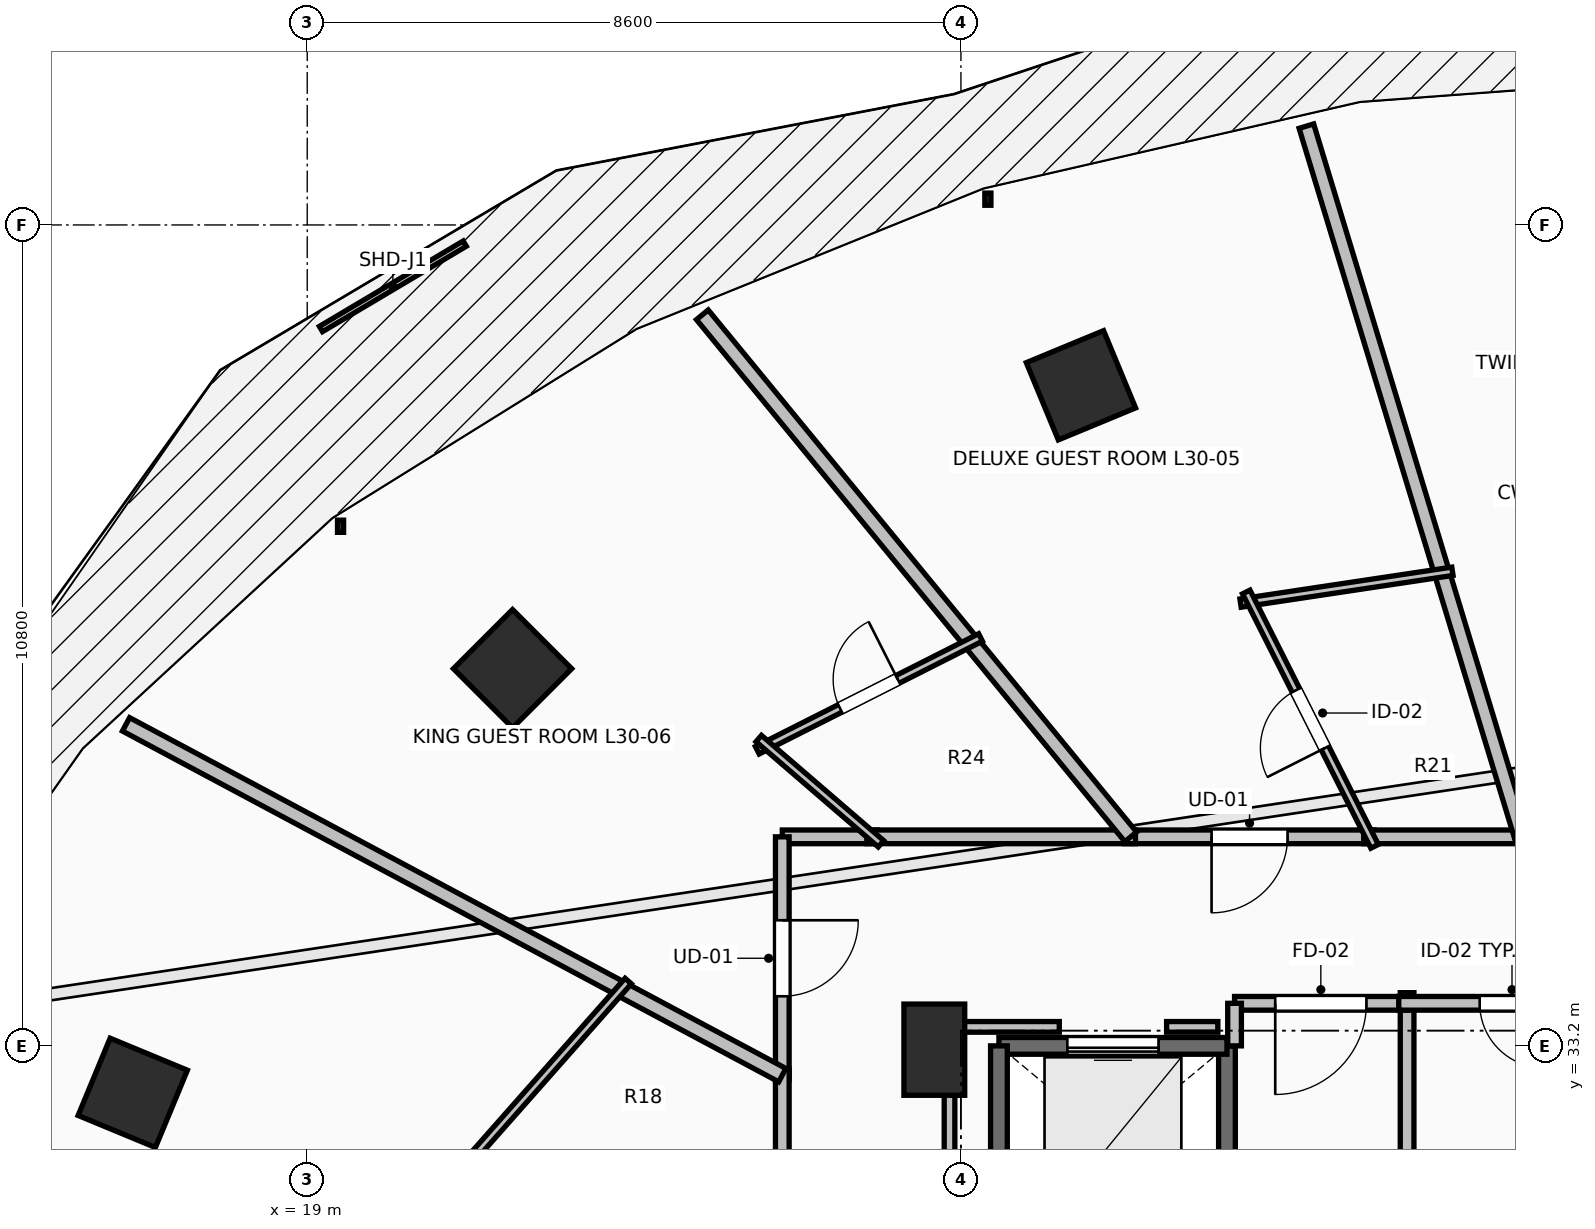
"""IFC4 building model, lengths in metres.
Left out: names, types, materials, properties, quantities, classifications, styles, units other than length and angle.
Written with IfcOpenShell. Run it as: python <this file> out.ifc"""

import sys

from ifc_helpers import new_model, si_unit, direction, frame, frame_2d, origin, origin_2d, place, context, subcontext, project, spatial, rectangle, extrude, element, fill, save


model = new_model("IFC4")
c1 = context("Model", 3, precision=1e-05, world=origin(), true_north=direction((0.0, 1.0)))
c2 = subcontext(c1, "Body", "Model", "MODEL_VIEW")
j1 = project(units=[si_unit("LENGTHUNIT", "METRE"), si_unit("PLANEANGLEUNIT", "RADIAN")], contexts=[c1])
p1 = place(None, origin())
s1 = spatial("IfcSite", under=j1, at=p1, CompositionType="ELEMENT")
p2 = place(p1, origin())
s2 = spatial("IfcBuilding", under=s1, at=p2, CompositionType="ELEMENT")
p3 = place(p2, frame((0.0, 0.0, 113.8)))
s3 = spatial("IfcBuildingStorey", under=s2, at=p3, CompositionType="ELEMENT", Elevation=113.8)
for number, where, z_axis, x_axis in (
    (1, (29.179, 41.891, 0.0), (0.0, 0.0, 1.0), (-0.383, 0.924, 0.0)),
    (2, (21.701, 38.162, 0.0), (0.0, 0.0, 1.0), (-0.707, 0.707, 0.0)),
    (3, (16.705, 32.582, 0.0), (0.0, 0.0, 1.0), (-0.924, 0.383, 0.0)),
):
    element("IfcColumn", number, at=place(p3, frame(where, z_axis=z_axis, x_axis=x_axis)), inside=s3, PredefinedType="COLUMN", context=c2, shape_type="SweptSolid", body=[
        extrude(rectangle(XDim=1.1, YDim=1.1, at=origin_2d()), origin(), (0.0, 0.0, 1.0), 3.5),
    ])
p4 = place(p3, frame((27.25, 33.15, 0.0), z_axis=(0.0, 0.0, 1.0), x_axis=(1.0, 0.0, 0.0)))
e4 = element("IfcColumn", 4, at=p4, inside=s3, PredefinedType="PILASTER", context=c2, shape_type="SweptSolid", body=[
    extrude(rectangle(XDim=0.8, YDim=1.2, at=origin_2d()), origin(), (0.0, 0.0, 1.0), 3.5),
])
p5 = place(p3, frame((31.1, 30.7, 0.0), z_axis=(0.0, 0.0, 1.0), x_axis=(0.0, 1.0, 0.0)))
e5 = element("IfcWall", 5, at=p5, inside=s3, PredefinedType="SOLIDWALL", context=c2, shape_type="SweptSolid", body=[
    extrude(rectangle(XDim=2.5, YDim=0.22, at=frame_2d((1.25, 0.0))), origin(), (0.0, 0.0, 1.0), 3.24),
])
p6 = place(p3, frame((31.1, 33.2, 0.0), z_axis=(0.0, 0.0, 1.0), x_axis=(-1.0, 0.0, 0.0)))
e6 = element("IfcWall", 6, at=p6, inside=s3, PredefinedType="SOLIDWALL", context=c2, shape_type="SweptSolid", body=[
    extrude(rectangle(XDim=3.0, YDim=0.22, at=frame_2d((1.5, 0.0))), origin(), (0.0, 0.0, 1.0), 3.24),
])
p7 = place(p6, frame((0.9, 0.0, 0.0)))
e7 = element("IfcOpeningElement", 7, at=p7, cuts=e6, PredefinedType="OPENING", context=c2, shape_type="SweptSolid", body=[
    extrude(rectangle(XDim=1.2, YDim=2.2, at=frame_2d((0.6, 1.1))), frame((0.0, 0.125, 0.0), z_axis=(0.0, -1.0, 0.0), x_axis=(1.0, 0.0, 0.0)), (0.0, 0.0, 1.0), 0.25),
])
p8 = place(p3, frame((28.1, 33.2, 0.0), z_axis=(0.0, 0.0, 1.0), x_axis=(0.0, -1.0, 0.0)))
e8 = element("IfcWall", 8, at=p8, inside=s3, PredefinedType="SOLIDWALL", context=c2, shape_type="SweptSolid", body=[
    extrude(rectangle(XDim=2.5, YDim=0.22, at=frame_2d((1.25, 0.0))), origin(), (0.0, 0.0, 1.0), 3.24),
])
p9 = place(p3, frame((33.47, 30.34, 0.0), z_axis=(0.0, 0.0, 1.0), x_axis=(0.0, 1.0, 0.0)))
e9 = element("IfcWall", 9, at=p9, inside=s3, PredefinedType="PARTITIONING", context=c2, shape_type="SweptSolid", body=[
    extrude(rectangle(XDim=3.56, YDim=0.18, at=frame_2d((1.78, 0.0))), origin(), (0.0, 0.0, 1.0), 3.24),
])
p10 = place(p3, frame((33.47, 33.76, 0.0), z_axis=(0.0, 0.0, 1.0), x_axis=(-1.0, 0.0, 0.0)))
e10 = element("IfcWall", 10, at=p10, inside=s3, PredefinedType="PARTITIONING", context=c2, shape_type="SweptSolid", body=[
    extrude(rectangle(XDim=2.27, YDim=0.18, at=frame_2d((1.135, 0.0))), origin(), (0.0, 0.0, 1.0), 3.24),
])
p11 = place(p10, frame((0.535, 0.0, 0.0)))
e11 = element("IfcOpeningElement", 11, at=p11, cuts=e10, PredefinedType="OPENING", context=c2, shape_type="SweptSolid", body=[
    extrude(rectangle(XDim=1.2, YDim=2.15, at=frame_2d((0.6, 1.075))), frame((0.0, 0.105, 0.0), z_axis=(0.0, -1.0, 0.0), x_axis=(1.0, 0.0, 0.0)), (0.0, 0.0, 1.0), 0.21),
])
p12 = place(p3, frame((31.2, 33.76, 0.0), z_axis=(0.0, 0.0, 1.0), x_axis=(0.0, -1.0, 0.0)))
e12 = element("IfcWall", 12, at=p12, inside=s3, PredefinedType="PARTITIONING", context=c2, shape_type="SweptSolid", body=[
    extrude(rectangle(XDim=0.56, YDim=0.18, at=frame_2d((0.28, 0.0))), origin(), (0.0, 0.0, 1.0), 3.24),
])
p13 = place(p3, frame((36.34, 33.76, 0.0), z_axis=(0.0, 0.0, 1.0), x_axis=(-1.0, 0.0, 0.0)))
e13 = element("IfcWall", 13, at=p13, inside=s3, PredefinedType="PARTITIONING", context=c2, shape_type="SweptSolid", body=[
    extrude(rectangle(XDim=2.98, YDim=0.18, at=frame_2d((1.49, 0.0))), origin(), (0.0, 0.0, 1.0), 3.24),
])
p14 = place(p13, frame((1.065, 0.0, 0.0)))
e14 = element("IfcOpeningElement", 14, at=p14, cuts=e13, PredefinedType="OPENING", context=c2, shape_type="SweptSolid", body=[
    extrude(rectangle(XDim=0.85, YDim=2.1, at=frame_2d((0.425, 1.05))), frame((0.0, 0.105, 0.0), z_axis=(0.0, -1.0, 0.0), x_axis=(1.0, 0.0, 0.0)), (0.0, 0.0, 1.0), 0.21),
])
p15 = place(p3, frame((33.039, 35.95, 0.0), z_axis=(0.0, 0.0, 1.0), x_axis=(-1.0, 0.0, 0.0)))
e15 = element("IfcWall", 15, at=p15, inside=s3, PredefinedType="PARTITIONING", context=c2, shape_type="SweptSolid", body=[
    extrude(rectangle(XDim=3.283, YDim=0.18, at=frame_2d((1.642, 0.0))), origin(), (0.0, 0.0, 1.0), 2.432),
])
p16 = place(p15, frame((1.142, 0.0, 0.0)))
e16 = element("IfcOpeningElement", 16, at=p16, cuts=e15, PredefinedType="OPENING", context=c2, shape_type="SweptSolid", body=[
    extrude(rectangle(XDim=1.0, YDim=2.15, at=frame_2d((0.5, 1.075))), frame((0.0, 0.105, 0.0), z_axis=(0.0, -1.0, 0.0), x_axis=(1.0, 0.0, 0.0)), (0.0, 0.0, 1.0), 0.21),
])
p17 = place(p3, frame((35.059, 35.95, 0.0), z_axis=(0.0, 0.0, 1.0), x_axis=(-1.0, 0.0, 0.0)))
e17 = element("IfcWall", 17, at=p17, inside=s3, PredefinedType="PARTITIONING", context=c2, shape_type="SweptSolid", body=[
    extrude(rectangle(XDim=2.16, YDim=0.18, at=frame_2d((1.08, 0.0))), origin(), (0.0, 0.0, 1.0), 3.24),
])
p18 = place(p3, frame((26.502, 35.95, 0.0), z_axis=(0.0, 0.0, 1.0), x_axis=(-1.0, 0.0, 0.0)))
e18 = element("IfcWall", 18, at=p18, inside=s3, PredefinedType="PARTITIONING", context=c2, shape_type="SweptSolid", body=[
    extrude(rectangle(XDim=1.252, YDim=0.18, at=frame_2d((0.626, 0.0))), origin(), (0.0, 0.0, 1.0), 3.24),
])
p19 = place(p3, frame((25.25, 35.95, 0.0), z_axis=(0.0, 0.0, 1.0), x_axis=(0.0, -1.0, 0.0)))
e19 = element("IfcWall", 19, at=p19, inside=s3, PredefinedType="PARTITIONING", context=c2, shape_type="SweptSolid", body=[
    extrude(rectangle(XDim=3.195, YDim=0.18, at=frame_2d((1.598, 0.0))), origin(), (0.0, 0.0, 1.0), 2.432),
])
p20 = place(p19, frame((1.097, 0.0, 0.0)))
e20 = element("IfcOpeningElement", 20, at=p20, cuts=e19, PredefinedType="OPENING", context=c2, shape_type="SweptSolid", body=[
    extrude(rectangle(XDim=1.0, YDim=2.15, at=frame_2d((0.5, 1.075))), frame((0.0, 0.105, 0.0), z_axis=(0.0, -1.0, 0.0), x_axis=(1.0, 0.0, 0.0)), (0.0, 0.0, 1.0), 0.21),
])
p21 = place(p3, frame((29.896, 35.95, 0.0), z_axis=(0.0, 0.0, 1.0), x_axis=(-1.0, 0.0, 0.0)))
e21 = element("IfcWall", 21, at=p21, inside=s3, PredefinedType="PARTITIONING", context=c2, shape_type="SweptSolid", body=[
    extrude(rectangle(XDim=3.534, YDim=0.18, at=frame_2d((1.767, 0.0))), origin(), (0.0, 0.0, 1.0), 2.432),
])
p22 = place(p3, frame((25.25, 32.895, 0.0), z_axis=(0.0, 0.0, 1.0), x_axis=(0.0, -1.0, 0.0)))
e22 = element("IfcWall", 22, at=p22, inside=s3, PredefinedType="PARTITIONING", context=c2, shape_type="SweptSolid", body=[
    extrude(rectangle(XDim=2.774, YDim=0.18, at=frame_2d((1.387, 0.0))), origin(), (0.0, 0.0, 1.0), 3.24),
])
p23 = place(p3, frame((32.145, 45.3, 0.0), z_axis=(0.0, 0.0, 1.0), x_axis=(0.290340247573, -0.956923476898, 0.0)))
e23 = element("IfcWall", 23, at=p23, inside=s3, PredefinedType="PARTITIONING", context=c2, shape_type="SweptSolid", body=[
    extrude(rectangle(XDim=9.771, YDim=0.2, at=frame_2d((4.885, 0.0))), origin(), (0.0, 0.0, 1.0), 2.432),
])
p24 = place(p3, frame((31.279, 39.025, 0.0), z_axis=(0.0, 0.0, 1.0), x_axis=(0.988909021514, 0.148522547675, 0.0)))
e24 = element("IfcWall", 24, at=p24, inside=s3, PredefinedType="PARTITIONING", context=c2, shape_type="SweptSolid", body=[
    extrude(rectangle(XDim=2.819, YDim=0.11, at=frame_2d((1.41, 0.0))), origin(), (0.0, 0.0, 1.0), 2.432),
])
p25 = place(p3, frame((33.042, 35.825, 0.0), z_axis=(0.0, 0.0, 1.0), x_axis=(-0.450415881942, 0.892818869253, 0.0)))
e25 = element("IfcWall", 25, at=p25, inside=s3, PredefinedType="PARTITIONING", context=c2, shape_type="SweptSolid", body=[
    extrude(rectangle(XDim=3.748, YDim=0.11, at=frame_2d((1.874, 0.0))), origin(), (0.0, 0.0, 1.0), 2.432),
])
p26 = place(p25, frame((1.449, 0.0, 0.0)))
e26 = element("IfcOpeningElement", 26, at=p26, cuts=e25, PredefinedType="OPENING", context=c2, shape_type="SweptSolid", body=[
    extrude(rectangle(XDim=0.85, YDim=2.1, at=frame_2d((0.425, 1.05))), frame((0.0, 0.07, 0.0), z_axis=(0.0, -1.0, 0.0), x_axis=(1.0, 0.0, 0.0)), (0.0, 0.0, 1.0), 0.14),
])
p27 = place(p3, frame((24.198, 42.818, 0.0), z_axis=(0.0, 0.0, 1.0), x_axis=(0.634354930471, -0.773041927833, 0.0)))
e27 = element("IfcWall", 27, at=p27, inside=s3, PredefinedType="PARTITIONING", context=c2, shape_type="SweptSolid", body=[
    extrude(rectangle(XDim=8.885, YDim=0.2, at=frame_2d((4.442, 0.0))), origin(), (0.0, 0.0, 1.0), 2.432),
])
p28 = place(p3, frame((24.921, 37.089, 0.0), z_axis=(0.0, 0.0, 1.0), x_axis=(0.892504738081, 0.451038016693, 0.0)))
e28 = element("IfcWall", 28, at=p28, inside=s3, PredefinedType="PARTITIONING", context=c2, shape_type="SweptSolid", body=[
    extrude(rectangle(XDim=3.291, YDim=0.11, at=frame_2d((1.645, 0.0))), origin(), (0.0, 0.0, 1.0), 2.886),
])
p29 = place(p28, frame((1.22, 0.0, 0.0)))
e29 = element("IfcOpeningElement", 29, at=p29, cuts=e28, PredefinedType="OPENING", context=c2, shape_type="SweptSolid", body=[
    extrude(rectangle(XDim=0.85, YDim=2.1, at=frame_2d((0.425, 1.05))), frame((0.0, 0.07, 0.0), z_axis=(0.0, -1.0, 0.0), x_axis=(1.0, 0.0, 0.0)), (0.0, 0.0, 1.0), 0.14),
])
p30 = place(p3, frame((26.548, 35.859, 0.0), z_axis=(0.0, 0.0, 1.0), x_axis=(-0.757776702782, 0.652513960556, 0.0)))
e30 = element("IfcWall", 30, at=p30, inside=s3, PredefinedType="PARTITIONING", context=c2, shape_type="SweptSolid", body=[
    extrude(rectangle(XDim=2.122, YDim=0.11, at=frame_2d((1.061, 0.0))), origin(), (0.0, 0.0, 1.0), 2.886),
])
p31 = place(p3, frame((16.616, 37.43, 0.0), z_axis=(0.0, 0.0, 1.0), x_axis=(0.881921122551, -0.471397002109, 0.0)))
e31 = element("IfcWall", 31, at=p31, inside=s3, PredefinedType="PARTITIONING", context=c2, shape_type="SweptSolid", body=[
    extrude(rectangle(XDim=9.79, YDim=0.2, at=frame_2d((4.895, 0.0))), origin(), (0.0, 0.0, 1.0), 2.677),
])
p32 = place(p3, frame((20.948, 31.479, 0.0), z_axis=(0.0, 0.0, 1.0), x_axis=(0.662155101597, 0.749366813669, 0.0)))
e32 = element("IfcWall", 32, at=p32, inside=s3, PredefinedType="PARTITIONING", context=c2, shape_type="SweptSolid", body=[
    extrude(rectangle(XDim=3.435, YDim=0.11, at=frame_2d((1.717, 0.0))), origin(), (0.0, 0.0, 1.0), 2.886),
])
p33 = place(p3, frame((27.45, 28.196, 0.0), z_axis=(0.0, 0.0, 1.0), x_axis=(0.0, 1.0, 0.0)))
e33 = element("IfcWall", 33, at=p33, inside=s3, PredefinedType="PARTITIONING", context=c2, shape_type="SweptSolid", body=[
    extrude(rectangle(XDim=5.254, YDim=0.14, at=frame_2d((2.627, 0.0))), origin(), (0.0, 0.0, 1.0), 2.432),
])
p34 = place(p3, frame((27.45, 33.45, 0.0), z_axis=(0.0, 0.0, 1.0), x_axis=(1.0, 0.0, 0.0)))
e34 = element("IfcWall", 34, at=p34, inside=s3, PredefinedType="PARTITIONING", context=c2, shape_type="SweptSolid", body=[
    extrude(rectangle(XDim=1.444, YDim=0.14, at=frame_2d((0.722, 0.0))), origin(), (0.0, 0.0, 1.0), 2.432),
])
p35 = place(p3, frame((30.306, 33.45, 0.0), z_axis=(0.0, 0.0, 1.0), x_axis=(1.0, 0.0, 0.0)))
e35 = element("IfcWall", 35, at=p35, inside=s3, PredefinedType="PARTITIONING", context=c2, shape_type="SweptSolid", body=[
    extrude(rectangle(XDim=0.674, YDim=0.14, at=frame_2d((0.337, 0.0))), origin(), (0.0, 0.0, 1.0), 3.24),
])
p36 = place(p7, origin())
e36 = element("IfcDoor", 36, at=p36, inside=s3, OperationType="SLIDING_TO_LEFT", PredefinedType="DOOR", context=c2, shape_type="SweptSolid", body=[
    extrude(rectangle(XDim=1.2, YDim=2.2, at=frame_2d((0.6, 1.1))), frame((0.0, 0.025, 0.0), z_axis=(0.0, -1.0, 0.0), x_axis=(1.0, 0.0, 0.0)), (0.0, 0.0, 1.0), 0.05),
])
fill(e7, e36)
p37 = place(p11, origin())
e37 = element("IfcDoor", 37, at=p37, inside=s3, OperationType="SINGLE_SWING_RIGHT", PredefinedType="DOOR", context=c2, shape_type="SweptSolid", body=[
    extrude(rectangle(XDim=1.2, YDim=2.15, at=frame_2d((0.6, 1.075))), frame((0.0, 0.025, 0.0), z_axis=(0.0, -1.0, 0.0), x_axis=(1.0, 0.0, 0.0)), (0.0, 0.0, 1.0), 0.05),
])
fill(e11, e37)
p38 = place(p14, origin())
e38 = element("IfcDoor", 38, at=p38, inside=s3, OperationType="SINGLE_SWING_LEFT", PredefinedType="DOOR", context=c2, shape_type="SweptSolid", body=[
    extrude(rectangle(XDim=0.85, YDim=2.1, at=frame_2d((0.425, 1.05))), frame((0.0, 0.025, 0.0), z_axis=(0.0, -1.0, 0.0), x_axis=(1.0, 0.0, 0.0)), (0.0, 0.0, 1.0), 0.05),
])
fill(e14, e38)
p39 = place(p16, origin())
e39 = element("IfcDoor", 39, at=p39, inside=s3, OperationType="SINGLE_SWING_RIGHT", PredefinedType="DOOR", context=c2, shape_type="SweptSolid", body=[
    extrude(rectangle(XDim=1.0, YDim=2.15, at=frame_2d((0.5, 1.075))), frame((0.0, 0.025, 0.0), z_axis=(0.0, -1.0, 0.0), x_axis=(1.0, 0.0, 0.0)), (0.0, 0.0, 1.0), 0.05),
])
fill(e16, e39)
p40 = place(p20, origin())
e40 = element("IfcDoor", 40, at=p40, inside=s3, OperationType="SINGLE_SWING_LEFT", PredefinedType="DOOR", context=c2, shape_type="SweptSolid", body=[
    extrude(rectangle(XDim=1.0, YDim=2.15, at=frame_2d((0.5, 1.075))), frame((0.0, 0.025, 0.0), z_axis=(0.0, -1.0, 0.0), x_axis=(1.0, 0.0, 0.0)), (0.0, 0.0, 1.0), 0.05),
])
fill(e20, e40)
p41 = place(p26, origin())
e41 = element("IfcDoor", 41, at=p41, inside=s3, OperationType="SINGLE_SWING_LEFT", PredefinedType="DOOR", context=c2, shape_type="SweptSolid", body=[
    extrude(rectangle(XDim=0.85, YDim=2.1, at=frame_2d((0.425, 1.05))), frame((0.0, 0.025, 0.0), z_axis=(0.0, -1.0, 0.0), x_axis=(1.0, 0.0, 0.0)), (0.0, 0.0, 1.0), 0.05),
])
fill(e26, e41)
p42 = place(p29, origin())
e42 = element("IfcDoor", 42, at=p42, inside=s3, OperationType="SINGLE_SWING_RIGHT", PredefinedType="DOOR", context=c2, shape_type="SweptSolid", body=[
    extrude(rectangle(XDim=0.85, YDim=2.1, at=frame_2d((0.425, 1.05))), frame((0.0, 0.025, 0.0), z_axis=(0.0, -1.0, 0.0), x_axis=(1.0, 0.0, 0.0)), (0.0, 0.0, 1.0), 0.05),
])
fill(e29, e42)
save(model, sys.argv[1])
